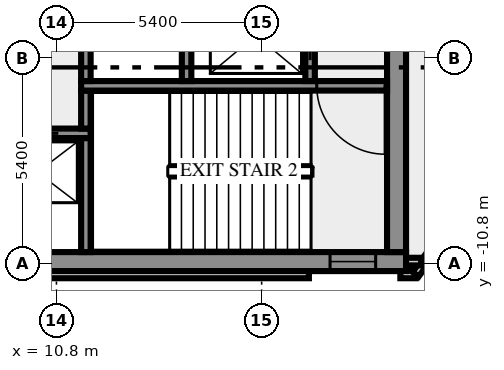
"""IFC4 building model, lengths in metres.
Left out: names, types, materials, properties, quantities, classifications, styles, units other than length and angle.
Written with IfcOpenShell. Run it as: python <this file> out.ifc"""

import sys

from ifc_helpers import new_model, si_unit, direction, frame, frame_2d, origin, place, context, subcontext, project, spatial, rectangle, extrude, element, fill, save


model = new_model("IFC4")
c1 = context("Model", 3, precision=1e-05, world=origin(), true_north=direction((0.0, 1.0)))
c2 = subcontext(c1, "Body", "Model", "MODEL_VIEW")
j1 = project(units=[si_unit("LENGTHUNIT", "METRE"), si_unit("PLANEANGLEUNIT", "RADIAN")], contexts=[c1])
p1 = place(None, origin())
s1 = spatial("IfcSite", under=j1, at=p1, CompositionType="ELEMENT")
p2 = place(p1, origin())
s2 = spatial("IfcBuilding", under=s1, at=p2, CompositionType="ELEMENT")
p3 = place(p2, frame((0.0, 0.0, 184.0)))
s3 = spatial("IfcBuildingStorey", under=s2, at=p3, CompositionType="ELEMENT", Elevation=184.0)
p4 = place(p3, frame((-17.444, -11.088, 0.0), z_axis=(0.0, 0.0, 1.0), x_axis=(1.0, 0.0, 0.0)))
e1 = element("IfcWall", 1, at=p4, inside=s3, PredefinedType="SOLIDWALL", context=c2, shape_type="SweptSolid", body=[
    extrude(rectangle(XDim=34.888, YDim=0.2, at=frame_2d((17.444, 0.0))), origin(), (0.0, 0.0, 1.0), 3.4),
])
p5 = place(p3, frame((19.85, -11.088, 0.0), z_axis=(0.0, 0.0, 1.0), x_axis=(1.0, 0.0, 0.0)))
e2 = element("IfcWall", 2, at=p5, inside=s3, PredefinedType="SOLIDWALL", context=c2, shape_type="SweptSolid", body=[
    extrude(rectangle(XDim=0.406, YDim=0.2, at=frame_2d((0.203, 0.0))), origin(), (0.0, 0.0, 1.0), 3.4),
])
p6 = place(p3, frame((20.253, -11.083, 0.0), z_axis=(0.0, 0.0, 1.0), x_axis=(0.587766567315, 0.809030569476, 0.0)))
e3 = element("IfcWall", 3, at=p6, inside=s3, PredefinedType="SOLIDWALL", context=c2, shape_type="SweptSolid", body=[
    extrude(rectangle(XDim=2.688, YDim=0.2, at=frame_2d((1.344, 0.0))), origin(), (0.0, 0.0, 1.0), 3.4),
])
p7 = place(p3, frame((19.98, -10.75, 0.0), z_axis=(0.0, 0.0, 1.0), x_axis=(1.0, 0.0, 0.0)))
e4 = element("IfcWall", 4, at=p7, inside=s3, PredefinedType="SOLIDWALL", context=c2, shape_type="SweptSolid", body=[
    extrude(rectangle(XDim=0.417, YDim=0.2, at=frame_2d((0.208, 0.0))), origin(), (0.0, 0.0, 1.0), 3.4),
])
p8 = place(p3, frame((-20.0, -10.75, 0.0), z_axis=(0.0, 0.0, 1.0), x_axis=(1.0, 0.0, 0.0)))
e5 = element("IfcWall", 5, at=p8, inside=s3, PredefinedType="SHEAR", context=c2, shape_type="SweptSolid", body=[
    extrude(rectangle(XDim=40.0, YDim=0.5, at=frame_2d((20.0, 0.0))), origin(), (0.0, 0.0, 1.0), 3.4),
])
p9 = place(p8, frame((0.8, 0.0, 1.0)))
e6 = element("IfcOpeningElement", 6, at=p9, cuts=e5, PredefinedType="OPENING", context=c2, shape_type="SweptSolid", body=[
    extrude(rectangle(XDim=1.2, YDim=1.2, at=frame_2d((0.6, 0.6))), frame((0.0, 0.26, 0.0), z_axis=(0.0, -1.0, 0.0), x_axis=(1.0, 0.0, 0.0)), (0.0, 0.0, 1.0), 0.52),
])
p10 = place(p8, frame((38.0, 0.0, 1.0)))
e7 = element("IfcOpeningElement", 7, at=p10, cuts=e5, PredefinedType="OPENING", context=c2, shape_type="SweptSolid", body=[
    extrude(rectangle(XDim=1.2, YDim=1.2, at=frame_2d((0.6, 0.6))), frame((0.0, 0.26, 0.0), z_axis=(0.0, -1.0, 0.0), x_axis=(1.0, 0.0, 0.0)), (0.0, 0.0, 1.0), 0.52),
])
p11 = place(p3, frame((11.575, -10.5, 0.0), z_axis=(0.0, 0.0, 1.0), x_axis=(0.0, 1.0, 0.0)))
e8 = element("IfcWall", 8, at=p11, inside=s3, PredefinedType="SHEAR", context=c2, shape_type="SweptSolid", body=[
    extrude(rectangle(XDim=3.0, YDim=0.25, at=frame_2d((1.5, 0.0))), origin(), (0.0, 0.0, 1.0), 3.4),
])
p12 = place(p3, frame((19.75, -10.5, 0.0), z_axis=(0.0, 0.0, 1.0), x_axis=(0.0, 1.0, 0.0)))
e9 = element("IfcWall", 9, at=p12, inside=s3, PredefinedType="SHEAR", context=c2, shape_type="SweptSolid", body=[
    extrude(rectangle(XDim=8.8, YDim=0.5, at=frame_2d((4.4, 0.0))), origin(), (0.0, 0.0, 1.0), 3.4),
])
p13 = place(p3, frame((11.7, -7.375, 0.0), z_axis=(0.0, 0.0, 1.0), x_axis=(-1.0, 0.0, 0.0)))
e10 = element("IfcWall", 10, at=p13, inside=s3, PredefinedType="SHEAR", context=c2, shape_type="SweptSolid", body=[
    extrude(rectangle(XDim=23.4, YDim=0.25, at=frame_2d((11.7, 0.0))), origin(), (0.0, 0.0, 1.0), 3.4),
])
p14 = place(p13, frame((20.613, 0.0, 0.0)))
e11 = element("IfcOpeningElement", 11, at=p14, cuts=e10, PredefinedType="OPENING", context=c2, shape_type="SweptSolid", body=[
    extrude(rectangle(XDim=0.9, YDim=2.1, at=frame_2d((0.45, 1.05))), frame((0.0, 0.135, 0.0), z_axis=(0.0, -1.0, 0.0), x_axis=(1.0, 0.0, 0.0)), (0.0, 0.0, 1.0), 0.27),
])
p15 = place(p13, frame((16.888, 0.0, 0.0)))
e12 = element("IfcOpeningElement", 12, at=p15, cuts=e10, PredefinedType="OPENING", context=c2, shape_type="SweptSolid", body=[
    extrude(rectangle(XDim=0.9, YDim=2.1, at=frame_2d((0.45, 1.05))), frame((0.0, 0.135, 0.0), z_axis=(0.0, -1.0, 0.0), x_axis=(1.0, 0.0, 0.0)), (0.0, 0.0, 1.0), 0.27),
])
p16 = place(p13, frame((14.25, 0.0, 0.0)))
e13 = element("IfcOpeningElement", 13, at=p16, cuts=e10, PredefinedType="OPENING", context=c2, shape_type="SweptSolid", body=[
    extrude(rectangle(XDim=0.9, YDim=2.1, at=frame_2d((0.45, 1.05))), frame((0.0, 0.135, 0.0), z_axis=(0.0, -1.0, 0.0), x_axis=(1.0, 0.0, 0.0)), (0.0, 0.0, 1.0), 0.27),
])
p17 = place(p13, frame((12.125, 0.0, 0.0)))
e14 = element("IfcOpeningElement", 14, at=p17, cuts=e10, PredefinedType="OPENING", context=c2, shape_type="SweptSolid", body=[
    extrude(rectangle(XDim=0.9, YDim=2.1, at=frame_2d((0.45, 1.05))), frame((0.0, 0.135, 0.0), z_axis=(0.0, -1.0, 0.0), x_axis=(1.0, 0.0, 0.0)), (0.0, 0.0, 1.0), 0.27),
])
p18 = place(p13, frame((10.45, 0.0, 0.0)))
e15 = element("IfcOpeningElement", 15, at=p18, cuts=e10, PredefinedType="OPENING", context=c2, shape_type="SweptSolid", body=[
    extrude(rectangle(XDim=0.75, YDim=2.1, at=frame_2d((0.375, 1.05))), frame((0.0, 0.135, 0.0), z_axis=(0.0, -1.0, 0.0), x_axis=(1.0, 0.0, 0.0)), (0.0, 0.0, 1.0), 0.27),
])
p19 = place(p13, frame((8.35, 0.0, 0.0)))
e16 = element("IfcOpeningElement", 16, at=p19, cuts=e10, PredefinedType="OPENING", context=c2, shape_type="SweptSolid", body=[
    extrude(rectangle(XDim=1.1, YDim=2.1, at=frame_2d((0.55, 1.05))), frame((0.0, 0.135, 0.0), z_axis=(0.0, -1.0, 0.0), x_axis=(1.0, 0.0, 0.0)), (0.0, 0.0, 1.0), 0.27),
])
p20 = place(p13, frame((5.85, 0.0, 0.0)))
e17 = element("IfcOpeningElement", 17, at=p20, cuts=e10, PredefinedType="OPENING", context=c2, shape_type="SweptSolid", body=[
    extrude(rectangle(XDim=1.1, YDim=2.1, at=frame_2d((0.55, 1.05))), frame((0.0, 0.135, 0.0), z_axis=(0.0, -1.0, 0.0), x_axis=(1.0, 0.0, 0.0)), (0.0, 0.0, 1.0), 0.27),
])
p21 = place(p13, frame((3.35, 0.0, 0.0)))
e18 = element("IfcOpeningElement", 18, at=p21, cuts=e10, PredefinedType="OPENING", context=c2, shape_type="SweptSolid", body=[
    extrude(rectangle(XDim=1.1, YDim=2.1, at=frame_2d((0.55, 1.05))), frame((0.0, 0.135, 0.0), z_axis=(0.0, -1.0, 0.0), x_axis=(1.0, 0.0, 0.0)), (0.0, 0.0, 1.0), 0.27),
])
p22 = place(p13, frame((0.85, 0.0, 0.0)))
e19 = element("IfcOpeningElement", 19, at=p22, cuts=e10, PredefinedType="OPENING", context=c2, shape_type="SweptSolid", body=[
    extrude(rectangle(XDim=1.1, YDim=2.1, at=frame_2d((0.55, 1.05))), frame((0.0, 0.135, 0.0), z_axis=(0.0, -1.0, 0.0), x_axis=(1.0, 0.0, 0.0)), (0.0, 0.0, 1.0), 0.27),
])
p23 = place(p3, frame((11.575, -7.25, 0.0), z_axis=(0.0, 0.0, 1.0), x_axis=(0.0, 1.0, 0.0)))
e20 = element("IfcWall", 20, at=p23, inside=s3, PredefinedType="SHEAR", context=c2, shape_type="SweptSolid", body=[
    extrude(rectangle(XDim=1.0, YDim=0.25, at=frame_2d((0.5, 0.0))), origin(), (0.0, 0.0, 1.0), 3.4),
])
p24 = place(p3, frame((19.5, -6.125, 0.0), z_axis=(0.0, 0.0, 1.0), x_axis=(-1.0, 0.0, 0.0)))
e21 = element("IfcWall", 21, at=p24, inside=s3, PredefinedType="SHEAR", context=c2, shape_type="SweptSolid", body=[
    extrude(rectangle(XDim=8.05, YDim=0.25, at=frame_2d((4.025, 0.0))), origin(), (0.0, 0.0, 1.0), 3.4),
])
p25 = place(p24, frame((0.05, 0.0, 0.0)))
e22 = element("IfcOpeningElement", 22, at=p25, cuts=e21, PredefinedType="OPENING", context=c2, shape_type="SweptSolid", body=[
    extrude(rectangle(XDim=1.8, YDim=2.1, at=frame_2d((0.9, 1.05))), frame((0.0, 0.135, 0.0), z_axis=(0.0, -1.0, 0.0), x_axis=(1.0, 0.0, 0.0)), (0.0, 0.0, 1.0), 0.27),
])
p26 = place(p3, frame((11.575, -6.0, 0.0), z_axis=(0.0, 0.0, 1.0), x_axis=(0.0, 1.0, 0.0)))
e23 = element("IfcWall", 23, at=p26, inside=s3, PredefinedType="SHEAR", context=c2, shape_type="SweptSolid", body=[
    extrude(rectangle(XDim=1.75, YDim=0.25, at=frame_2d((0.875, 0.0))), origin(), (0.0, 0.0, 1.0), 3.4),
])
p27 = place(p3, frame((14.225, -6.0, 0.0), z_axis=(0.0, 0.0, 1.0), x_axis=(0.0, 1.0, 0.0)))
e24 = element("IfcWall", 24, at=p27, inside=s3, PredefinedType="SHEAR", context=c2, shape_type="SweptSolid", body=[
    extrude(rectangle(XDim=4.3, YDim=0.25, at=frame_2d((2.15, 0.0))), origin(), (0.0, 0.0, 1.0), 3.4),
])
p28 = place(p3, frame((17.475, -6.0, 0.0), z_axis=(0.0, 0.0, 1.0), x_axis=(0.0, 1.0, 0.0)))
e25 = element("IfcWall", 25, at=p28, inside=s3, PredefinedType="SHEAR", context=c2, shape_type="SweptSolid", body=[
    extrude(rectangle(XDim=4.3, YDim=0.25, at=frame_2d((2.15, 0.0))), origin(), (0.0, 0.0, 1.0), 3.4),
])
p29 = place(p28, frame((0.55, 0.0, 0.0)))
e26 = element("IfcOpeningElement", 26, at=p29, cuts=e25, PredefinedType="OPENING", context=c2, shape_type="SweptSolid", body=[
    extrude(rectangle(XDim=1.3, YDim=2.1, at=frame_2d((0.65, 1.05))), frame((0.0, 0.135, 0.0), z_axis=(0.0, -1.0, 0.0), x_axis=(1.0, 0.0, 0.0)), (0.0, 0.0, 1.0), 0.27),
])
p30 = place(p10, origin())
e27 = element("IfcWindow", 27, at=p30, inside=s3, PartitioningType="SINGLE_PANEL", PredefinedType="WINDOW", context=c2, shape_type="SweptSolid", body=[
    extrude(rectangle(XDim=1.2, YDim=1.2, at=frame_2d((0.6, 0.6))), frame((0.0, 0.03, 0.0), z_axis=(0.0, -1.0, 0.0), x_axis=(1.0, 0.0, 0.0)), (0.0, 0.0, 1.0), 0.06),
])
fill(e7, e27)
p31 = place(p22, origin())
e28 = element("IfcDoor", 28, at=p31, inside=s3, OperationType="DOUBLE_DOOR_SLIDING", PredefinedType="DOOR", context=c2, shape_type="SweptSolid", body=[
    extrude(rectangle(XDim=1.1, YDim=2.1, at=frame_2d((0.55, 1.05))), frame((0.0, 0.025, 0.0), z_axis=(0.0, -1.0, 0.0), x_axis=(1.0, 0.0, 0.0)), (0.0, 0.0, 1.0), 0.05),
])
fill(e19, e28)
p32 = place(p25, origin())
e29 = element("IfcDoor", 29, at=p32, inside=s3, OperationType="DOUBLE_DOOR_SINGLE_SWING", PredefinedType="DOOR", context=c2, shape_type="SweptSolid", body=[
    extrude(rectangle(XDim=1.8, YDim=2.1, at=frame_2d((0.9, 1.05))), frame((0.0, 0.025, 0.0), z_axis=(0.0, -1.0, 0.0), x_axis=(1.0, 0.0, 0.0)), (0.0, 0.0, 1.0), 0.05),
])
fill(e22, e29)
p33 = place(p29, origin())
e30 = element("IfcDoor", 30, at=p33, inside=s3, OperationType="DOUBLE_DOOR_SLIDING", PredefinedType="DOOR", context=c2, shape_type="SweptSolid", body=[
    extrude(rectangle(XDim=1.3, YDim=2.1, at=frame_2d((0.65, 1.05))), frame((0.0, 0.025, 0.0), z_axis=(0.0, -1.0, 0.0), x_axis=(1.0, 0.0, 0.0)), (0.0, 0.0, 1.0), 0.05),
])
fill(e26, e30)
save(model, sys.argv[1])
